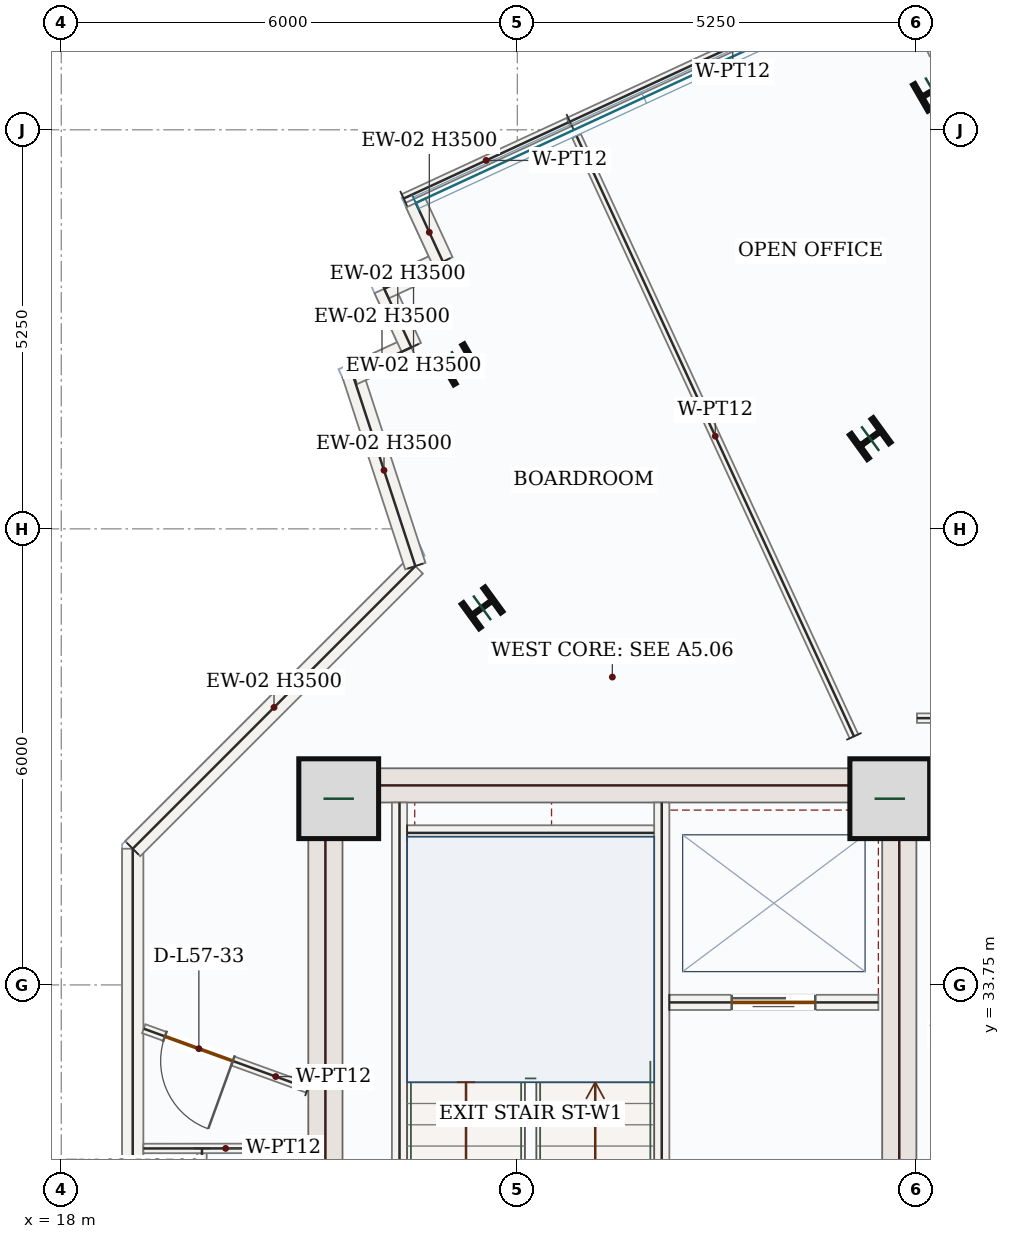
"""IFC4 building model, lengths in metres.
Left out: names, types, materials, properties, quantities, classifications, styles, units other than length and angle.
Written with IfcOpenShell. Run it as: python <this file> out.ifc"""

import sys

from ifc_helpers import new_model, si_unit, direction, frame, frame_2d, origin, origin_2d, place, context, subcontext, project, spatial, rectangle, i_section, extrude, source, transform, mapped, element, fill, save


model = new_model("IFC4")
c1 = context("Model", 3, precision=1e-05, world=origin(), true_north=direction((0.0, 1.0)))
c2 = subcontext(c1, "Body", "Model", "MODEL_VIEW")
j1 = project(units=[si_unit("LENGTHUNIT", "METRE"), si_unit("PLANEANGLEUNIT", "RADIAN")], contexts=[c1])
p1 = place(None, origin())
s1 = spatial("IfcSite", under=j1, at=p1, CompositionType="ELEMENT")
p2 = place(p1, origin())
s2 = spatial("IfcBuilding", under=s1, at=p2, CompositionType="ELEMENT")
p3 = place(p2, frame((0.0, 0.0, 242.85)))
s3 = spatial("IfcBuildingStorey", under=s2, at=p3, CompositionType="ELEMENT", Elevation=242.85)
m1 = source(origin(), c2, "Body", "SweptSolid", [
    extrude(rectangle(XDim=8.55, YDim=0.45, at=frame_2d((4.275, 0.0))), origin(), (0.0, 0.0, 1.0), 3.5),
])
p4 = place(p3, frame((21.475, 28.05, 0.0), z_axis=(0.0, 0.0, 1.0), x_axis=(0.0, 1.0, 0.0)))
e1 = element("IfcWall", 1, at=p4, inside=s3, PredefinedType="SHEAR", context=c2, shape_type="MappedRepresentation", body=[
    mapped(m1, transform((0.0, 0.0, 0.0), x_axis=(1.0, 0.0, 0.0), y_axis=(0.0, 1.0, 0.0), z_axis=(0.0, 0.0, 1.0), scale=1.0)),
])
p5 = place(p3, frame((29.025, 28.05, 0.0), z_axis=(0.0, 0.0, 1.0), x_axis=(0.0, 1.0, 0.0)))
e2 = element("IfcWall", 2, at=p5, inside=s3, PredefinedType="SHEAR", context=c2, shape_type="SweptSolid", body=[
    extrude(rectangle(XDim=8.55, YDim=0.45, at=frame_2d((4.275, 0.0))), origin(), (0.0, 0.0, 1.0), 3.5),
])
p6 = place(p5, frame((1.5, 0.0, 0.0)))
e3 = element("IfcOpeningElement", 3, at=p6, cuts=e2, PredefinedType="OPENING", context=c2, shape_type="SweptSolid", body=[
    extrude(rectangle(XDim=1.1, YDim=2.2, at=frame_2d((0.55, 1.1))), frame((0.0, 0.235, 0.0), z_axis=(0.0, -1.0, 0.0), x_axis=(1.0, 0.0, 0.0)), (0.0, 0.0, 1.0), 0.47),
])
m2 = source(origin(), c2, "Body", "SweptSolid", [
    extrude(rectangle(XDim=7.1, YDim=0.45, at=frame_2d((3.55, 0.0))), origin(), (0.0, 0.0, 1.0), 3.5),
])
p7 = place(p3, frame((21.7, 36.375, 0.0), z_axis=(0.0, 0.0, 1.0), x_axis=(1.0, 0.0, 0.0)))
e4 = element("IfcWall", 4, at=p7, inside=s3, PredefinedType="SHEAR", context=c2, shape_type="MappedRepresentation", body=[
    mapped(m2, transform((0.0, 0.0, 0.0), x_axis=(1.0, 0.0, 0.0), y_axis=(0.0, 1.0, 0.0), z_axis=(0.0, 0.0, 1.0), scale=1.0)),
])
m3 = source(origin(), c2, "Body", "SweptSolid", [
    extrude(rectangle(XDim=1.05, YDim=1.05, at=origin_2d()), origin(), (0.0, 0.0, 1.0), 3.75),
])
for number, where, z_axis, x_axis in (
    (5, (21.65, 36.2, 0.0), (0.0, 0.0, 1.0), (1.0, 0.0, 0.0)),
    (6, (28.9, 36.2, 0.0), (0.0, 0.0, 1.0), (1.0, 0.0, 0.0)),
):
    element("IfcColumn", number, at=place(p3, frame(where, z_axis=z_axis, x_axis=x_axis)), inside=s3, PredefinedType="COLUMN", context=c2, shape_type="MappedRepresentation", body=[
        mapped(m3, transform((0.0, 0.0, 0.0), x_axis=(1.0, 0.0, 0.0), y_axis=(0.0, 1.0, 0.0), z_axis=(0.0, 0.0, 1.0), scale=1.0)),
    ])
m4 = source(origin(), c2, "Body", "SweptSolid", [
    extrude(i_section(OverallWidth=0.399, OverallDepth=0.386, WebThickness=0.021, FlangeThickness=0.033, FilletRadius=0.018, at=origin_2d()), origin(), (0.0, 0.0, 1.0), 3.75),
])
for number, where, z_axis, x_axis in (
    (7, (28.643, 40.937, 0.0), (0.0, 0.0, 1.0), (-0.588, 0.809, 0.0)),
    (8, (23.536, 38.711, 0.0), (0.0, 0.0, 1.0), (-0.588, 0.809, 0.0)),
    (9, (29.468, 45.514, 0.0), (0.0, 0.0, 1.0), (-0.5, 0.866, 0.0)),
    (10, (23.232, 41.914, 0.0), (0.0, 0.0, 1.0), (-0.5, 0.866, 0.0)),
):
    element("IfcColumn", number, at=place(p3, frame(where, z_axis=z_axis, x_axis=x_axis)), inside=s3, PredefinedType="COLUMN", context=c2, shape_type="MappedRepresentation", body=[
        mapped(m4, transform((0.0, 0.0, 0.0), x_axis=(1.0, 0.0, 0.0), y_axis=(0.0, 1.0, 0.0), z_axis=(0.0, 0.0, 1.0), scale=1.0)),
    ])
m5 = source(origin(), c2, "Body", "SweptSolid", [
    extrude(rectangle(XDim=9.088, YDim=0.28, at=frame_2d((4.544, 0.0))), origin(), (0.0, 0.0, 1.0), 3.5),
])
p8 = place(p3, frame((18.94, 26.454, 0.0), z_axis=(0.0, 0.0, 1.0), x_axis=(0.0, 1.0, 0.0)))
e11 = element("IfcWall", 11, at=p8, inside=s3, PredefinedType="SOLIDWALL", context=c2, shape_type="MappedRepresentation", body=[
    mapped(m5, transform((0.0, 0.0, 0.0), x_axis=(1.0, 0.0, 0.0), y_axis=(0.0, 1.0, 0.0), z_axis=(0.0, 0.0, 1.0), scale=1.0)),
])
m6 = source(origin(), c2, "Body", "SweptSolid", [
    extrude(rectangle(XDim=5.258, YDim=0.28, at=frame_2d((2.629, 0.0))), origin(), (0.0, 0.0, 1.0), 3.5),
])
p9 = place(p3, frame((18.94, 35.542, 0.0), z_axis=(0.0, 0.0, 1.0), x_axis=(0.707106781187, 0.707106781187, 0.0)))
e12 = element("IfcWall", 12, at=p9, inside=s3, PredefinedType="SOLIDWALL", context=c2, shape_type="MappedRepresentation", body=[
    mapped(m6, transform((0.0, 0.0, 0.0), x_axis=(1.0, 0.0, 0.0), y_axis=(0.0, 1.0, 0.0), z_axis=(0.0, 0.0, 1.0), scale=1.0)),
])
m7 = source(origin(), c2, "Body", "SweptSolid", [
    extrude(rectangle(XDim=2.652, YDim=0.28, at=frame_2d((1.326, 0.0))), origin(), (0.0, 0.0, 1.0), 3.5),
])
p10 = place(p3, frame((22.658, 39.26, 0.0), z_axis=(0.0, 0.0, 1.0), x_axis=(-0.310838004308, 0.950462905682, 0.0)))
e13 = element("IfcWall", 13, at=p10, inside=s3, PredefinedType="SOLIDWALL", context=c2, shape_type="MappedRepresentation", body=[
    mapped(m7, transform((0.0, 0.0, 0.0), x_axis=(1.0, 0.0, 0.0), y_axis=(0.0, 1.0, 0.0), z_axis=(0.0, 0.0, 1.0), scale=1.0)),
])
m8 = source(origin(), c2, "Body", "SweptSolid", [
    extrude(rectangle(XDim=0.85, YDim=0.28, at=frame_2d((0.425, 0.0))), origin(), (0.0, 0.0, 1.0), 3.5),
])
for number, where, z_axis, x_axis in (
    (14, (21.833, 41.781, 0.0), (0.0, 0.0, 1.0), (0.908, 0.419, 0.0)),
    (15, (22.605, 42.137, 0.0), (0.0, 0.0, 1.0), (-0.419, 0.908, 0.0)),
):
    element("IfcWall", number, at=place(p3, frame(where, z_axis=z_axis, x_axis=x_axis)), inside=s3, PredefinedType="SOLIDWALL", context=c2, shape_type="MappedRepresentation", body=[
        mapped(m8, transform((0.0, 0.0, 0.0), x_axis=(1.0, 0.0, 0.0), y_axis=(0.0, 1.0, 0.0), z_axis=(0.0, 0.0, 1.0), scale=1.0)),
    ])
m9 = source(origin(), c2, "Body", "SweptSolid", [
    extrude(rectangle(XDim=0.85, YDim=0.28, at=frame_2d((0.425, 0.0))), origin(), (0.0, 0.0, 1.0), 3.5),
])
p11 = place(p3, frame((22.249, 42.909, 0.0), z_axis=(0.0, 0.0, 1.0), x_axis=(0.907791150023, 0.419422493365, 0.0)))
e16 = element("IfcWall", 16, at=p11, inside=s3, PredefinedType="SOLIDWALL", context=c2, shape_type="MappedRepresentation", body=[
    mapped(m9, transform((0.0, 0.0, 0.0), x_axis=(1.0, 0.0, 0.0), y_axis=(0.0, 1.0, 0.0), z_axis=(0.0, 0.0, 1.0), scale=1.0)),
])
p12 = place(p3, frame((23.02, 43.266, 0.0), z_axis=(0.0, 0.0, 1.0), x_axis=(-0.419313139191, 0.907841666427, 0.0)))
e17 = element("IfcWall", 17, at=p12, inside=s3, PredefinedType="SOLIDWALL", context=c2, shape_type="MappedRepresentation", body=[
    mapped(m8, transform((0.0, 0.0, 0.0), x_axis=(1.0, 0.0, 0.0), y_axis=(0.0, 1.0, 0.0), z_axis=(0.0, 0.0, 1.0), scale=1.0)),
])
m10 = source(origin(), c2, "Body", "SweptSolid", [
    extrude(rectangle(XDim=7.87, YDim=0.2, at=frame_2d((3.935, 0.0))), origin(), (0.0, 0.0, 1.0), 3.5),
])
p13 = place(p3, frame((22.45, 28.28, 0.0), z_axis=(0.0, 0.0, 1.0), x_axis=(0.0, 1.0, 0.0)))
e18 = element("IfcWall", 18, at=p13, inside=s3, PredefinedType="SOLIDWALL", context=c2, shape_type="MappedRepresentation", body=[
    mapped(m10, transform((0.0, 0.0, 0.0), x_axis=(1.0, 0.0, 0.0), y_axis=(0.0, 1.0, 0.0), z_axis=(0.0, 0.0, 1.0), scale=1.0)),
])
p14 = place(p3, frame((25.9, 28.15, 0.0), z_axis=(0.0, 0.0, 1.0), x_axis=(0.0, 1.0, 0.0)))
e19 = element("IfcWall", 19, at=p14, inside=s3, PredefinedType="SOLIDWALL", context=c2, shape_type="SweptSolid", body=[
    extrude(rectangle(XDim=8.0, YDim=0.2, at=frame_2d((4.0, 0.0))), origin(), (0.0, 0.0, 1.0), 3.5),
])
p15 = place(p14, frame((0.4, 0.0, 0.0)))
e20 = element("IfcOpeningElement", 20, at=p15, cuts=e19, PredefinedType="OPENING", context=c2, shape_type="SweptSolid", body=[
    extrude(rectangle(XDim=1.05, YDim=2.15, at=frame_2d((0.525, 1.075))), frame((0.0, 0.11, 0.0), z_axis=(0.0, -1.0, 0.0), x_axis=(1.0, 0.0, 0.0)), (0.0, 0.0, 1.0), 0.22),
])
m11 = source(origin(), c2, "Body", "SweptSolid", [
    extrude(rectangle(XDim=3.25, YDim=0.2, at=frame_2d((1.625, 0.0))), origin(), (0.0, 0.0, 1.0), 3.5),
])
p16 = place(p3, frame((22.55, 35.75, 0.0), z_axis=(0.0, 0.0, 1.0), x_axis=(1.0, 0.0, 0.0)))
e21 = element("IfcWall", 21, at=p16, inside=s3, PredefinedType="SOLIDWALL", context=c2, shape_type="MappedRepresentation", body=[
    mapped(m11, transform((0.0, 0.0, 0.0), x_axis=(1.0, 0.0, 0.0), y_axis=(0.0, 1.0, 0.0), z_axis=(0.0, 0.0, 1.0), scale=1.0)),
])
p17 = place(p3, frame((26.0, 33.52, 0.0), z_axis=(0.0, 0.0, 1.0), x_axis=(1.0, 0.0, 0.0)))
e22 = element("IfcWall", 22, at=p17, inside=s3, PredefinedType="SOLIDWALL", context=c2, shape_type="SweptSolid", body=[
    extrude(rectangle(XDim=2.75, YDim=0.2, at=frame_2d((1.375, 0.0))), origin(), (0.0, 0.0, 1.0), 3.5),
])
p18 = place(p17, frame((0.82, 0.0, 0.0)))
e23 = element("IfcOpeningElement", 23, at=p18, cuts=e22, PredefinedType="OPENING", context=c2, shape_type="SweptSolid", body=[
    extrude(rectangle(XDim=1.1, YDim=2.15, at=frame_2d((0.55, 1.075))), frame((0.0, 0.11, 0.0), z_axis=(0.0, -1.0, 0.0), x_axis=(1.0, 0.0, 0.0)), (0.0, 0.0, 1.0), 0.22),
])
p19 = place(p3, frame((33.443, 37.26, 0.0), z_axis=(0.0, 0.0, 1.0), x_axis=(-0.999999998299, -5.8329445e-05, 0.0)))
e24 = element("IfcWall", 24, at=p19, inside=s3, PredefinedType="PARTITIONING", context=c2, shape_type="SweptSolid", body=[
    extrude(rectangle(XDim=4.186, YDim=0.125, at=frame_2d((2.093, 0.0))), origin(), (0.0, 0.0, 1.0), 3.5),
])
p20 = place(p19, frame((0.712, 0.0, 0.0)))
e25 = element("IfcOpeningElement", 25, at=p20, cuts=e24, PredefinedType="OPENING", context=c2, shape_type="SweptSolid", body=[
    extrude(rectangle(XDim=0.95, YDim=2.15, at=frame_2d((0.475, 1.075))), frame((0.0, 0.073, 0.0), z_axis=(0.0, -1.0, 0.0), x_axis=(1.0, 0.0, 0.0)), (0.0, 0.0, 1.0), 0.145),
])
m12 = source(origin(), c2, "Body", "SweptSolid", [
    extrude(rectangle(XDim=8.701, YDim=0.125, at=frame_2d((4.351, 0.0))), origin(), (0.0, 0.0, 1.0), 3.5),
])
p21 = place(p3, frame((28.429, 37.02, 0.0), z_axis=(0.0, 0.0, 1.0), x_axis=(-0.419458495046, 0.907774515468, 0.0)))
e26 = element("IfcWall", 26, at=p21, inside=s3, PredefinedType="PARTITIONING", context=c2, shape_type="MappedRepresentation", body=[
    mapped(m12, transform((0.0, 0.0, 0.0), x_axis=(1.0, 0.0, 0.0), y_axis=(0.0, 1.0, 0.0), z_axis=(0.0, 0.0, 1.0), scale=1.0)),
])
m13 = source(origin(), c2, "Body", "SweptSolid", [
    extrude(rectangle(XDim=4.72, YDim=0.125, at=frame_2d((2.36, 0.0))), origin(), (0.0, 0.0, 1.0), 3.5),
])
p22 = place(p3, frame((24.692, 45.107, 0.0), z_axis=(0.0, 0.0, 1.0), x_axis=(0.907753377062, 0.419504238873, 0.0)))
e27 = element("IfcWall", 27, at=p22, inside=s3, PredefinedType="PARTITIONING", context=c2, shape_type="MappedRepresentation", body=[
    mapped(m13, transform((0.0, 0.0, 0.0), x_axis=(1.0, 0.0, 0.0), y_axis=(0.0, 1.0, 0.0), z_axis=(0.0, 0.0, 1.0), scale=1.0)),
])
m14 = source(origin(), c2, "Body", "SweptSolid", [
    extrude(rectangle(XDim=0.996, YDim=0.125, at=frame_2d((0.498, 0.0))), origin(), (0.0, 0.0, 1.0), 3.5),
])
p23 = place(p3, frame((29.064, 46.898, 0.0), z_axis=(0.0, 0.0, 1.0), x_axis=(0.419540149112, -0.907736780836, 0.0)))
e28 = element("IfcWall", 28, at=p23, inside=s3, PredefinedType="PARTITIONING", context=c2, shape_type="MappedRepresentation", body=[
    mapped(m14, transform((0.0, 0.0, 0.0), x_axis=(1.0, 0.0, 0.0), y_axis=(0.0, 1.0, 0.0), z_axis=(0.0, 0.0, 1.0), scale=1.0)),
])
p24 = place(p3, frame((21.245, 32.391, 0.0), z_axis=(0.0, 0.0, 1.0), x_axis=(-0.940115637779, 0.340855669755, 0.0)))
e29 = element("IfcWall", 29, at=p24, inside=s3, PredefinedType="PARTITIONING", context=c2, shape_type="SweptSolid", body=[
    extrude(rectangle(XDim=2.298, YDim=0.125, at=frame_2d((1.149, 0.0))), origin(), (0.0, 0.0, 1.0), 3.5),
])
p25 = place(p24, frame((1.051, 0.0, 0.0)))
e30 = element("IfcOpeningElement", 30, at=p25, cuts=e29, PredefinedType="OPENING", context=c2, shape_type="SweptSolid", body=[
    extrude(rectangle(XDim=0.95, YDim=2.15, at=frame_2d((0.475, 1.075))), frame((0.0, 0.073, 0.0), z_axis=(0.0, -1.0, 0.0), x_axis=(1.0, 0.0, 0.0)), (0.0, 0.0, 1.0), 0.145),
])
m15 = source(origin(), c2, "Body", "SweptSolid", [
    extrude(rectangle(XDim=2.39, YDim=0.125, at=frame_2d((1.195, 0.0))), origin(), (0.0, 0.0, 1.0), 3.5),
])
p26 = place(p3, frame((22.505, 44.096, 0.0), z_axis=(0.0, 0.0, 1.0), x_axis=(0.907773916688, 0.419459790898, 0.0)))
e31 = element("IfcWall", 31, at=p26, inside=s3, PredefinedType="PARTITIONING", context=c2, shape_type="MappedRepresentation", body=[
    mapped(m15, transform((0.0, 0.0, 0.0), x_axis=(1.0, 0.0, 0.0), y_axis=(0.0, 1.0, 0.0), z_axis=(0.0, 0.0, 1.0), scale=1.0)),
])
p27 = place(p3, frame((19.851, 31.599, 0.0), z_axis=(0.0, 0.0, 1.0), x_axis=(-7.9685508e-05, -0.999999996825, 0.0)))
e32 = element("IfcWall", 32, at=p27, inside=s3, PredefinedType="PARTITIONING", context=c2, shape_type="SweptSolid", body=[
    extrude(rectangle(XDim=9.191, YDim=0.125, at=frame_2d((4.596, 0.0))), origin(), (0.0, 0.0, 1.0), 3.5),
])
p28 = place(p27, frame((5.357, 0.0, 0.0)))
e33 = element("IfcOpeningElement", 33, at=p28, cuts=e32, PredefinedType="OPENING", context=c2, shape_type="SweptSolid", body=[
    extrude(rectangle(XDim=0.95, YDim=2.15, at=frame_2d((0.475, 1.075))), frame((0.0, 0.073, 0.0), z_axis=(0.0, -1.0, 0.0), x_axis=(1.0, 0.0, 0.0)), (0.0, 0.0, 1.0), 0.145),
])
m16 = source(origin(), c2, "Body", "SweptSolid", [
    extrude(rectangle(XDim=2.165, YDim=0.125, at=frame_2d((1.083, 0.0))), origin(), (0.0, 0.0, 1.0), 3.5),
])
p29 = place(p3, frame((21.245, 31.6, 0.0), z_axis=(0.0, 0.0, 1.0), x_axis=(-0.999999688459, -0.000789354738, 0.0)))
e34 = element("IfcWall", 34, at=p29, inside=s3, PredefinedType="PARTITIONING", context=c2, shape_type="MappedRepresentation", body=[
    mapped(m16, transform((0.0, 0.0, 0.0), x_axis=(1.0, 0.0, 0.0), y_axis=(0.0, 1.0, 0.0), z_axis=(0.0, 0.0, 1.0), scale=1.0)),
])
m17 = source(origin(), c2, "Body", "SweptSolid", [
    extrude(rectangle(XDim=1.1, YDim=2.15, at=frame_2d((0.55, 1.075))), frame((0.0, 0.025, 0.0), z_axis=(0.0, -1.0, 0.0), x_axis=(1.0, 0.0, 0.0)), (0.0, 0.0, 1.0), 0.05),
])
p30 = place(p18, origin())
e35 = element("IfcDoor", 35, at=p30, inside=s3, OperationType="DOUBLE_DOOR_SLIDING", PredefinedType="DOOR", context=c2, shape_type="MappedRepresentation", body=[
    mapped(m17, transform((0.0, 0.0, 0.0), x_axis=(1.0, 0.0, 0.0), y_axis=(0.0, 1.0, 0.0), z_axis=(0.0, 0.0, 1.0), scale=1.0)),
])
fill(e23, e35)
m18 = source(origin(), c2, "Body", "SweptSolid", [
    extrude(rectangle(XDim=0.95, YDim=2.15, at=frame_2d((0.475, 1.075))), frame((0.0, 0.025, 0.0), z_axis=(0.0, -1.0, 0.0), x_axis=(1.0, 0.0, 0.0)), (0.0, 0.0, 1.0), 0.05),
])
p31 = place(p25, origin())
e36 = element("IfcDoor", 36, at=p31, inside=s3, OperationType="SINGLE_SWING_LEFT", PredefinedType="DOOR", context=c2, shape_type="MappedRepresentation", body=[
    mapped(m18, transform((0.0, 0.0, 0.0), x_axis=(1.0, 0.0, 0.0), y_axis=(0.0, 1.0, 0.0), z_axis=(0.0, 0.0, 1.0), scale=1.0)),
])
fill(e30, e36)
save(model, sys.argv[1])
